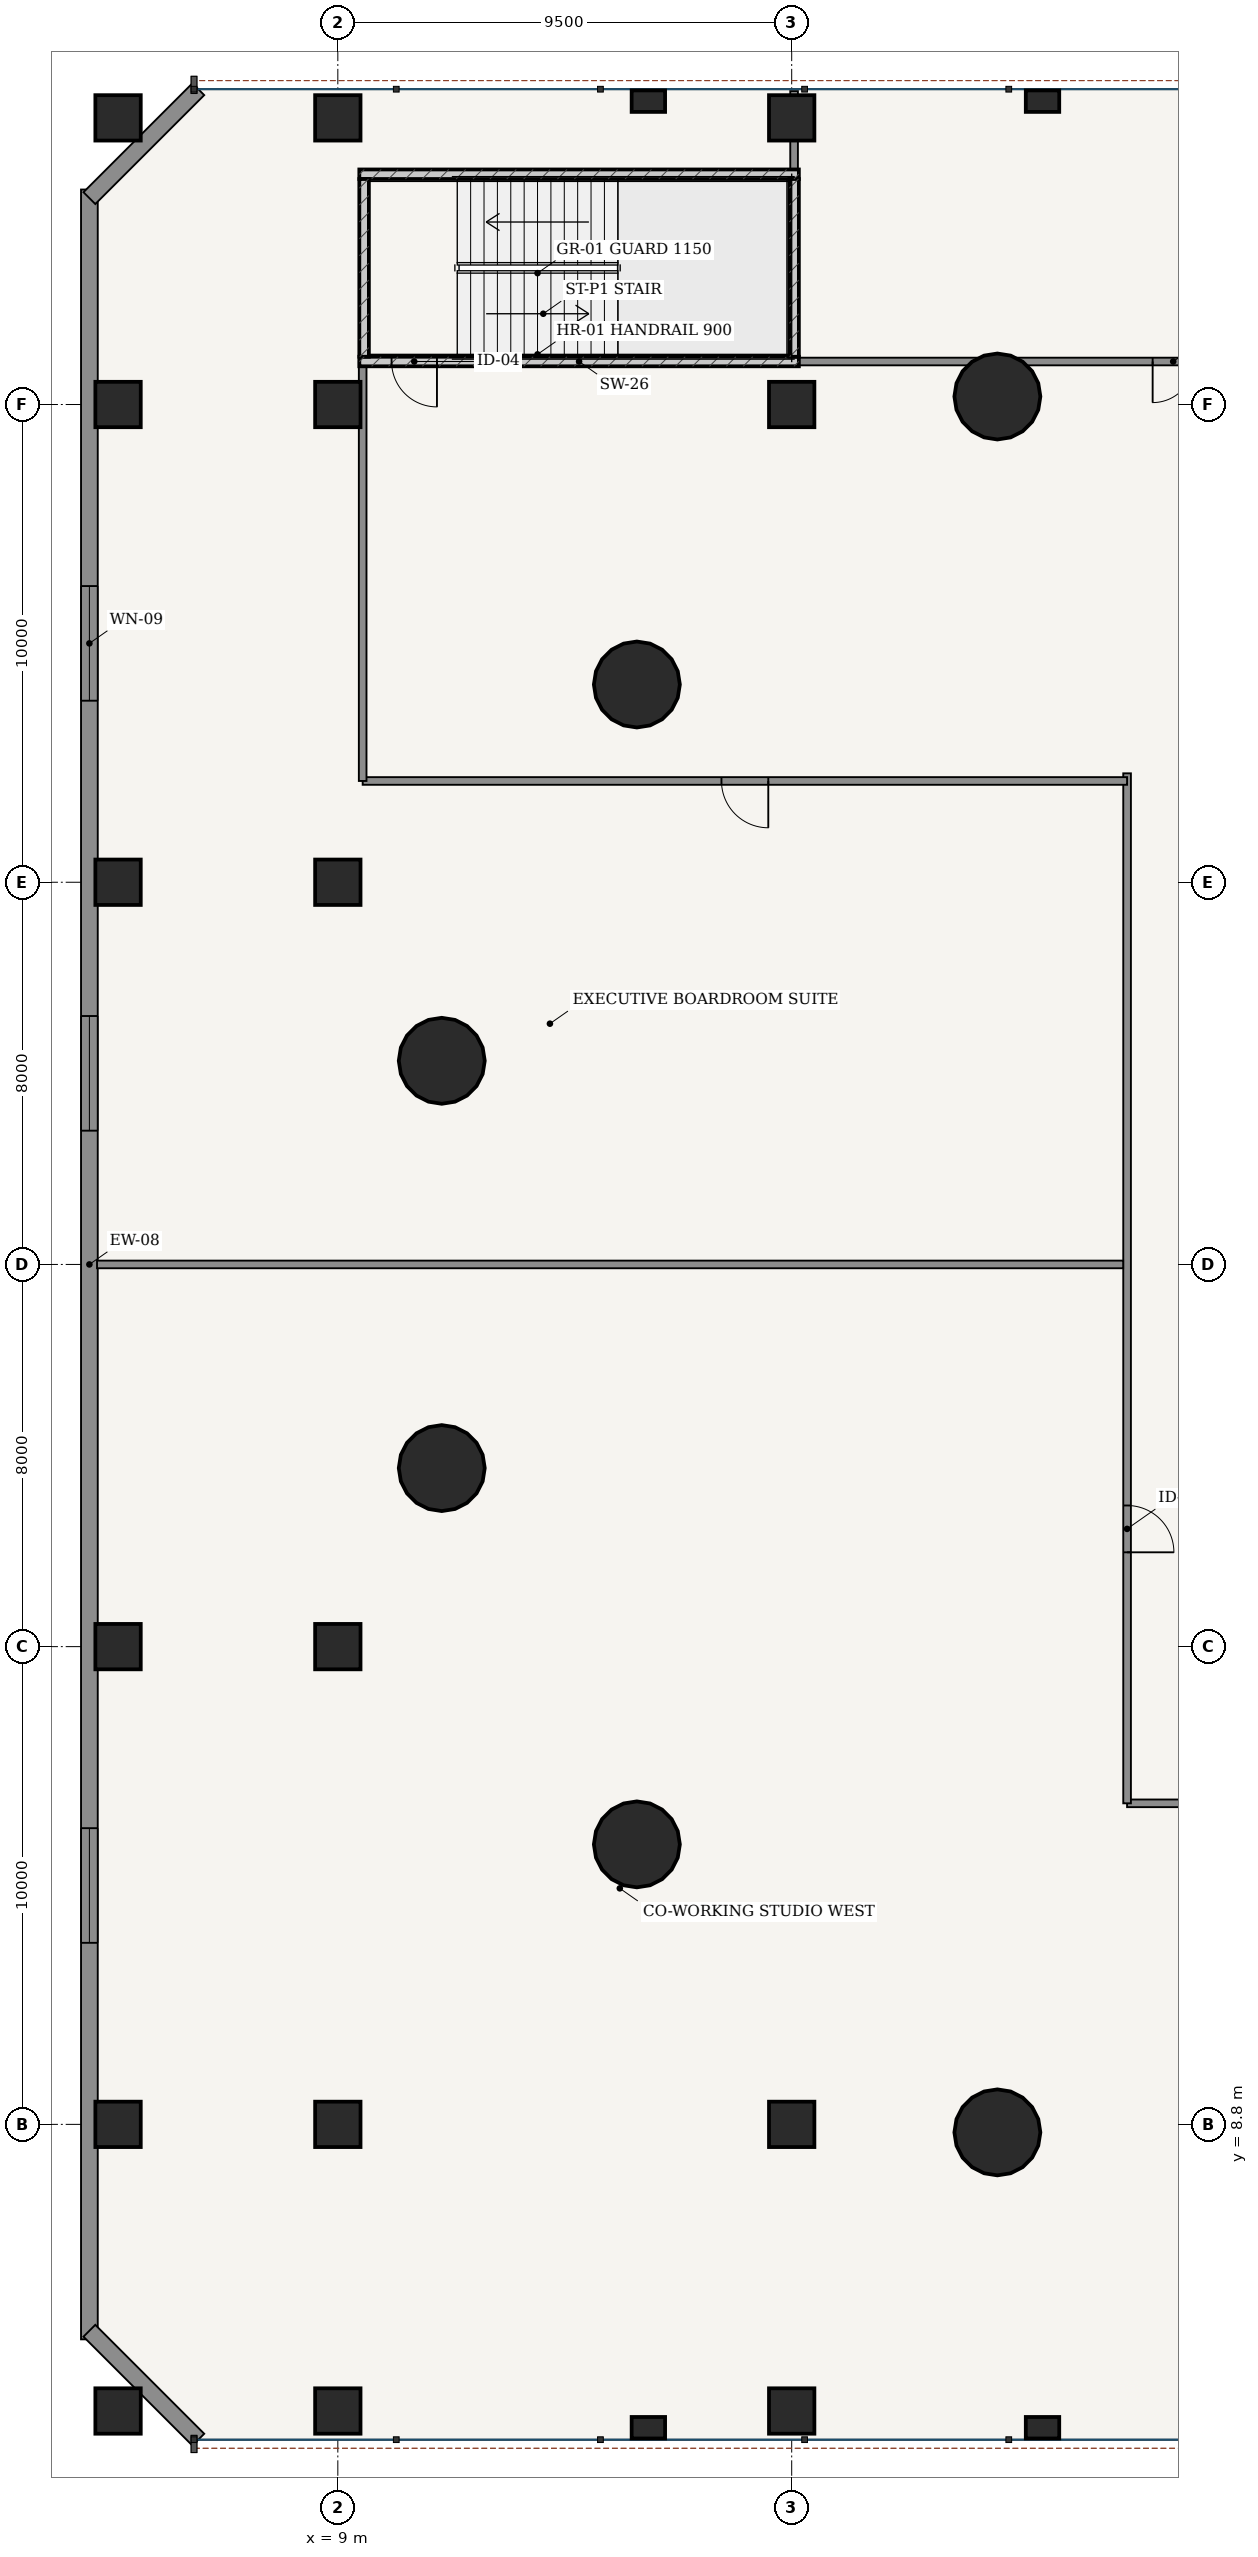
"""IFC4 building model, lengths in metres.
Left out: names, types, materials, properties, quantities, classifications, styles, units other than length and angle.
Written with IfcOpenShell. Run it as: python <this file> out.ifc"""

import sys

from ifc_helpers import new_model, si_unit, direction, frame, frame_2d, origin, origin_2d, place, context, subcontext, project, spatial, rectangle, hollow_circle, extrude, source, transform, mapped, element, fill, save


model = new_model("IFC4")
c1 = context("Model", 3, precision=1e-05, world=origin(), true_north=direction((-0.2419218956, 0.970295726276)))
c2 = subcontext(c1, "Body", "Model", "MODEL_VIEW")
j1 = project(units=[si_unit("LENGTHUNIT", "METRE"), si_unit("PLANEANGLEUNIT", "RADIAN")], contexts=[c1])
p1 = place(None, origin())
s1 = spatial("IfcSite", under=j1, at=p1, CompositionType="ELEMENT")
p2 = place(p1, origin())
s2 = spatial("IfcBuilding", under=s1, at=p2, CompositionType="ELEMENT")
p3 = place(p2, frame((0.0, 0.0, 9.9)))
s3 = spatial("IfcBuildingStorey", under=s2, at=p3, CompositionType="ELEMENT", Elevation=9.9)
p4 = place(p3, frame((9.45, 45.7, 0.0), z_axis=(0.0, 0.0, 1.0), x_axis=(1.0, 0.0, 0.0)))
e1 = element("IfcWall", 1, at=p4, inside=s3, PredefinedType="SOLIDWALL", context=c2, shape_type="SweptSolid", body=[
    extrude(rectangle(XDim=9.2, YDim=0.2, at=frame_2d((4.6, 0.0))), origin(), (0.0, 0.0, 1.0), 4.2),
])
p5 = place(p4, frame((0.675, 0.0, 0.0)))
e2 = element("IfcOpeningElement", 2, at=p5, cuts=e1, PredefinedType="OPENING", context=c2, shape_type="SweptSolid", body=[
    extrude(rectangle(XDim=0.95, YDim=2.15, at=frame_2d((0.475, 1.075))), frame((0.0, 0.11, 0.0), z_axis=(0.0, -1.0, 0.0), x_axis=(1.0, 0.0, 0.0)), (0.0, 0.0, 1.0), 0.22),
])
p6 = place(p3, frame((9.45, 49.62, 0.0), z_axis=(0.0, 0.0, 1.0), x_axis=(1.0, 0.0, 0.0)))
e3 = element("IfcWall", 3, at=p6, inside=s3, PredefinedType="SOLIDWALL", context=c2, shape_type="SweptSolid", body=[
    extrude(rectangle(XDim=9.2, YDim=0.2, at=frame_2d((4.6, 0.0))), origin(), (0.0, 0.0, 1.0), 4.2),
])
for number, where, z_axis, x_axis in (
    (4, (9.55, 45.8, 0.0), (0.0, 0.0, 1.0), (0.0, 1.0, 0.0)),
    (5, (18.55, 45.8, 0.0), (0.0, 0.0, 1.0), (0.0, 1.0, 0.0)),
):
    element("IfcWall", number, at=place(p3, frame(where, z_axis=z_axis, x_axis=x_axis)), inside=s3, PredefinedType="SOLIDWALL", context=c2, shape_type="SweptSolid", body=[
        extrude(rectangle(XDim=3.72, YDim=0.2, at=frame_2d((1.86, 0.0))), origin(), (0.0, 0.0, 1.0), 4.2),
    ])
for number, where, z_axis, x_axis in (
    (6, (22.805, 44.968, 0.0), (0.0, 0.0, 1.0), (1.0, 0.0, 0.0)),
    (7, (15.259, 38.939, 0.0), (0.0, 0.0, 1.0), (1.0, 0.0, 0.0)),
    (8, (11.176, 31.063, 0.0), (0.0, 0.0, 1.0), (1.0, 0.0, 0.0)),
    (9, (11.176, 22.537, 0.0), (0.0, 0.0, 1.0), (1.0, 0.0, 0.0)),
    (10, (15.259, 14.661, 0.0), (0.0, 0.0, 1.0), (1.0, 0.0, 0.0)),
    (11, (22.805, 8.632, 0.0), (0.0, 0.0, 1.0), (1.0, 0.0, 0.0)),
):
    element("IfcColumn", number, at=place(p3, frame(where, z_axis=z_axis, x_axis=x_axis)), inside=s3, PredefinedType="COLUMN", context=c2, shape_type="SweptSolid", body=[
        extrude(hollow_circle(Radius=0.9, WallThickness=0.055, at=origin_2d()), origin(), (0.0, 0.0, 1.0), 4.5),
    ])
for number, where, z_axis, x_axis in (
    (12, (4.4, 2.8, 0.0), (0.0, 0.0, 1.0), (1.0, 0.0, 0.0)),
    (13, (4.4, 8.8, 0.0), (0.0, 0.0, 1.0), (1.0, 0.0, 0.0)),
    (14, (4.4, 18.8, 0.0), (0.0, 0.0, 1.0), (1.0, 0.0, 0.0)),
    (15, (4.4, 34.8, 0.0), (0.0, 0.0, 1.0), (1.0, 0.0, 0.0)),
    (16, (4.4, 44.8, 0.0), (0.0, 0.0, 1.0), (1.0, 0.0, 0.0)),
    (17, (4.4, 50.8, 0.0), (0.0, 0.0, 1.0), (1.0, 0.0, 0.0)),
    (18, (9.0, 2.8, 0.0), (0.0, 0.0, 1.0), (1.0, 0.0, 0.0)),
    (19, (9.0, 8.8, 0.0), (0.0, 0.0, 1.0), (1.0, 0.0, 0.0)),
    (20, (9.0, 18.8, 0.0), (0.0, 0.0, 1.0), (1.0, 0.0, 0.0)),
    (21, (9.0, 34.8, 0.0), (0.0, 0.0, 1.0), (1.0, 0.0, 0.0)),
    (22, (9.0, 44.8, 0.0), (0.0, 0.0, 1.0), (1.0, 0.0, 0.0)),
    (23, (9.0, 50.8, 0.0), (0.0, 0.0, 1.0), (1.0, 0.0, 0.0)),
    (24, (18.5, 2.8, 0.0), (0.0, 0.0, 1.0), (1.0, 0.0, 0.0)),
    (25, (18.5, 8.8, 0.0), (0.0, 0.0, 1.0), (1.0, 0.0, 0.0)),
    (26, (18.5, 44.8, 0.0), (0.0, 0.0, 1.0), (1.0, 0.0, 0.0)),
    (27, (18.5, 50.8, 0.0), (0.0, 0.0, 1.0), (1.0, 0.0, 0.0)),
):
    element("IfcColumn", number, at=place(p3, frame(where, z_axis=z_axis, x_axis=x_axis)), inside=s3, PredefinedType="COLUMN", context=c2, shape_type="SweptSolid", body=[
        extrude(rectangle(XDim=0.95, YDim=0.95, at=origin_2d()), origin(), (0.0, 0.0, 1.0), 4.5),
    ])
for number, where, z_axis, x_axis in (
    (28, (15.5, 2.45, 0.0), (0.0, 0.0, 1.0), (1.0, 0.0, 0.0)),
    (29, (15.5, 51.15, 0.0), (0.0, 0.0, 1.0), (1.0, 0.0, 0.0)),
    (30, (23.75, 2.45, 0.0), (0.0, 0.0, 1.0), (1.0, 0.0, 0.0)),
    (31, (23.75, 51.15, 0.0), (0.0, 0.0, 1.0), (1.0, 0.0, 0.0)),
):
    element("IfcColumn", number, at=place(p3, frame(where, z_axis=z_axis, x_axis=x_axis)), inside=s3, PredefinedType="PILASTER", context=c2, shape_type="SweptSolid", body=[
        extrude(rectangle(XDim=0.7, YDim=0.45, at=origin_2d()), origin(), (0.0, 0.0, 1.0), 4.5),
    ])
p7 = place(p3, frame((3.8, 49.3, 0.0), z_axis=(0.0, 0.0, 1.0), x_axis=(0.0, -1.0, 0.0)))
e32 = element("IfcWall", 32, at=p7, inside=s3, PredefinedType="SOLIDWALL", context=c2, shape_type="SweptSolid", body=[
    extrude(rectangle(XDim=45.0, YDim=0.35, at=frame_2d((22.5, 0.0))), origin(), (0.0, 0.0, 1.0), 4.2),
])
p8 = place(p7, frame((8.3, 0.0, 0.85)))
e33 = element("IfcOpeningElement", 33, at=p8, cuts=e32, PredefinedType="OPENING", context=c2, shape_type="SweptSolid", body=[
    extrude(rectangle(XDim=2.4, YDim=2.2, at=frame_2d((1.2, 1.1))), frame((0.0, 0.185, 0.0), z_axis=(0.0, -1.0, 0.0), x_axis=(1.0, 0.0, 0.0)), (0.0, 0.0, 1.0), 0.37),
])
p9 = place(p7, frame((17.3, 0.0, 0.85)))
e34 = element("IfcOpeningElement", 34, at=p9, cuts=e32, PredefinedType="OPENING", context=c2, shape_type="SweptSolid", body=[
    extrude(rectangle(XDim=2.4, YDim=2.2, at=frame_2d((1.2, 1.1))), frame((0.0, 0.185, 0.0), z_axis=(0.0, -1.0, 0.0), x_axis=(1.0, 0.0, 0.0)), (0.0, 0.0, 1.0), 0.37),
])
p10 = place(p7, frame((34.3, 0.0, 0.85)))
e35 = element("IfcOpeningElement", 35, at=p10, cuts=e32, PredefinedType="OPENING", context=c2, shape_type="SweptSolid", body=[
    extrude(rectangle(XDim=2.4, YDim=2.2, at=frame_2d((1.2, 1.1))), frame((0.0, 0.185, 0.0), z_axis=(0.0, -1.0, 0.0), x_axis=(1.0, 0.0, 0.0)), (0.0, 0.0, 1.0), 0.37),
])
for number, where, z_axis, x_axis in (
    (36, (3.8, 4.48, 0.0), (0.0, 0.0, 1.0), (0.707, -0.707, 0.0)),
    (37, (6.08, 51.4, 0.0), (0.0, 0.0, 1.0), (-0.707, -0.707, 0.0)),
):
    element("IfcWall", number, at=place(p3, frame(where, z_axis=z_axis, x_axis=x_axis)), inside=s3, PredefinedType="SOLIDWALL", context=c2, shape_type="SweptSolid", body=[
        extrude(rectangle(XDim=3.224, YDim=0.35, at=frame_2d((1.612, 0.0))), origin(), (0.0, 0.0, 1.0), 3.235),
    ])
p11 = place(p3, frame((25.52, 15.52, 0.0), z_axis=(0.0, 0.0, 1.0), x_axis=(1.0, 0.0, 0.0)))
e38 = element("IfcWall", 38, at=p11, inside=s3, PredefinedType="PARTITIONING", context=c2, shape_type="SweptSolid", body=[
    extrude(rectangle(XDim=24.96, YDim=0.16, at=frame_2d((12.48, 0.0))), origin(), (0.0, 0.0, 1.0), 3.55),
])
p12 = place(p11, frame((5.854, 0.0, 0.0)))
e39 = element("IfcOpeningElement", 39, at=p12, cuts=e38, PredefinedType="OPENING", context=c2, shape_type="SweptSolid", body=[
    extrude(rectangle(XDim=0.98, YDim=2.2, at=frame_2d((0.49, 1.1))), frame((0.0, 0.09, 0.0), z_axis=(0.0, -1.0, 0.0), x_axis=(1.0, 0.0, 0.0)), (0.0, 0.0, 1.0), 0.18),
])
p13 = place(p11, frame((18.125, 0.0, 0.0)))
e40 = element("IfcOpeningElement", 40, at=p13, cuts=e38, PredefinedType="OPENING", context=c2, shape_type="SweptSolid", body=[
    extrude(rectangle(XDim=0.98, YDim=2.2, at=frame_2d((0.49, 1.1))), frame((0.0, 0.09, 0.0), z_axis=(0.0, -1.0, 0.0), x_axis=(1.0, 0.0, 0.0)), (0.0, 0.0, 1.0), 0.18),
])
p14 = place(p3, frame((25.52, 15.52, 0.0), z_axis=(0.0, 0.0, 1.0), x_axis=(0.0, 1.0, 0.0)))
e41 = element("IfcWall", 41, at=p14, inside=s3, PredefinedType="PARTITIONING", context=c2, shape_type="SweptSolid", body=[
    extrude(rectangle(XDim=21.56, YDim=0.16, at=frame_2d((10.78, 0.0))), origin(), (0.0, 0.0, 1.0), 3.55),
])
p15 = place(p14, frame((5.254, 0.0, 0.0)))
e42 = element("IfcOpeningElement", 42, at=p15, cuts=e41, PredefinedType="OPENING", context=c2, shape_type="SweptSolid", body=[
    extrude(rectangle(XDim=0.98, YDim=2.2, at=frame_2d((0.49, 1.1))), frame((0.0, 0.09, 0.0), z_axis=(0.0, -1.0, 0.0), x_axis=(1.0, 0.0, 0.0)), (0.0, 0.0, 1.0), 0.18),
])
p16 = place(p3, frame((9.52, 36.92, 0.0), z_axis=(0.0, 0.0, 1.0), x_axis=(1.0, 0.0, 0.0)))
e43 = element("IfcWall", 43, at=p16, inside=s3, PredefinedType="PARTITIONING", context=c2, shape_type="SweptSolid", body=[
    extrude(rectangle(XDim=16.0, YDim=0.16, at=frame_2d((8.0, 0.0))), origin(), (0.0, 0.0, 1.0), 3.55),
])
p17 = place(p16, frame((7.51, 0.0, 0.0)))
e44 = element("IfcOpeningElement", 44, at=p17, cuts=e43, PredefinedType="OPENING", context=c2, shape_type="SweptSolid", body=[
    extrude(rectangle(XDim=0.98, YDim=2.2, at=frame_2d((0.49, 1.1))), frame((0.0, 0.09, 0.0), z_axis=(0.0, -1.0, 0.0), x_axis=(1.0, 0.0, 0.0)), (0.0, 0.0, 1.0), 0.18),
])
p18 = place(p3, frame((9.52, 36.92, 0.0), z_axis=(0.0, 0.0, 1.0), x_axis=(0.0, 1.0, 0.0)))
e45 = element("IfcWall", 45, at=p18, inside=s3, PredefinedType="PARTITIONING", context=c2, shape_type="SweptSolid", body=[
    extrude(rectangle(XDim=8.78, YDim=0.16, at=frame_2d((4.39, 0.0))), origin(), (0.0, 0.0, 1.0), 3.569),
])
p19 = place(p3, frame((18.55, 45.7, 0.0), z_axis=(0.0, 0.0, 1.0), x_axis=(1.0, 0.0, 0.0)))
e46 = element("IfcWall", 46, at=p19, inside=s3, PredefinedType="PARTITIONING", context=c2, shape_type="SweptSolid", body=[
    extrude(rectangle(XDim=38.9, YDim=0.16, at=frame_2d((19.45, 0.0))), origin(), (0.0, 0.0, 1.0), 3.55),
])
p20 = place(p19, frame((7.505, 0.0, 0.0)))
e47 = element("IfcOpeningElement", 47, at=p20, cuts=e46, PredefinedType="OPENING", context=c2, shape_type="SweptSolid", body=[
    extrude(rectangle(XDim=0.86, YDim=2.1, at=frame_2d((0.43, 1.05))), frame((0.0, 0.09, 0.0), z_axis=(0.0, -1.0, 0.0), x_axis=(1.0, 0.0, 0.0)), (0.0, 0.0, 1.0), 0.18),
])
p21 = place(p19, frame((19.02, 0.0, 0.0)))
e48 = element("IfcOpeningElement", 48, at=p21, cuts=e46, PredefinedType="OPENING", context=c2, shape_type="SweptSolid", body=[
    extrude(rectangle(XDim=0.86, YDim=2.1, at=frame_2d((0.43, 1.05))), frame((0.0, 0.09, 0.0), z_axis=(0.0, -1.0, 0.0), x_axis=(1.0, 0.0, 0.0)), (0.0, 0.0, 1.0), 0.18),
])
p22 = place(p19, frame((30.475, 0.0, 0.0)))
e49 = element("IfcOpeningElement", 49, at=p22, cuts=e46, PredefinedType="OPENING", context=c2, shape_type="SweptSolid", body=[
    extrude(rectangle(XDim=0.98, YDim=2.2, at=frame_2d((0.49, 1.1))), frame((0.0, 0.09, 0.0), z_axis=(0.0, -1.0, 0.0), x_axis=(1.0, 0.0, 0.0)), (0.0, 0.0, 1.0), 0.18),
])
p23 = place(p3, frame((3.96, 26.8, 0.0), z_axis=(0.0, 0.0, 1.0), x_axis=(1.0, 0.0, 0.0)))
e50 = element("IfcWall", 50, at=p23, inside=s3, PredefinedType="PARTITIONING", context=c2, shape_type="SweptSolid", body=[
    extrude(rectangle(XDim=21.478, YDim=0.16, at=frame_2d((10.739, 0.0))), origin(), (0.0, 0.0, 1.0), 3.642),
])
p24 = place(p3, frame((18.55, 49.722, 0.0), z_axis=(0.0, 0.0, 1.0), x_axis=(0.0, 1.0, 0.0)))
e51 = element("IfcWall", 51, at=p24, inside=s3, PredefinedType="PARTITIONING", context=c2, shape_type="SweptSolid", body=[
    extrude(rectangle(XDim=1.638, YDim=0.16, at=frame_2d((0.819, 0.0))), origin(), (0.0, 0.0, 1.0), 3.235),
])
m1 = source(origin(), c2, "Body", "SweptSolid", [
    extrude(rectangle(XDim=2.4, YDim=2.2, at=frame_2d((1.2, 1.1))), frame((0.0, 0.03, 0.0), z_axis=(0.0, -1.0, 0.0), x_axis=(1.0, 0.0, 0.0)), (0.0, 0.0, 1.0), 0.06),
])
p25 = place(p8, origin())
e52 = element("IfcWindow", 52, at=p25, inside=s3, PartitioningType="SINGLE_PANEL", PredefinedType="WINDOW", context=c2, shape_type="MappedRepresentation", body=[
    mapped(m1, transform((0.0, 0.0, 0.0), scale=1.0)),
])
fill(e33, e52)
p26 = place(p9, origin())
e53 = element("IfcWindow", 53, at=p26, inside=s3, PartitioningType="SINGLE_PANEL", PredefinedType="WINDOW", context=c2, shape_type="MappedRepresentation", body=[
    mapped(m1, transform((0.0, 0.0, 0.0), scale=1.0)),
])
fill(e34, e53)
p27 = place(p10, origin())
e54 = element("IfcWindow", 54, at=p27, inside=s3, PartitioningType="SINGLE_PANEL", PredefinedType="WINDOW", context=c2, shape_type="MappedRepresentation", body=[
    mapped(m1, transform((0.0, 0.0, 0.0), scale=1.0)),
])
fill(e35, e54)
m2 = source(origin(), c2, "Body", "SweptSolid", [
    extrude(rectangle(XDim=0.95, YDim=2.15, at=frame_2d((0.475, 1.075))), frame((0.0, 0.025, 0.0), z_axis=(0.0, -1.0, 0.0), x_axis=(1.0, 0.0, 0.0)), (0.0, 0.0, 1.0), 0.05),
])
p28 = place(p5, frame((0.95, 0.0, 0.0), z_axis=(0.0, 0.0, 1.0), x_axis=(-1.0, 0.0, 0.0)))
e55 = element("IfcDoor", 55, at=p28, inside=s3, OperationType="SINGLE_SWING_LEFT", PredefinedType="DOOR", context=c2, shape_type="MappedRepresentation", body=[
    mapped(m2, transform((0.0, 0.0, 0.0), scale=1.0)),
])
fill(e2, e55)
m3 = source(origin(), c2, "Body", "SweptSolid", [
    extrude(rectangle(XDim=0.98, YDim=2.2, at=frame_2d((0.49, 1.1))), frame((0.0, 0.025, 0.0), z_axis=(0.0, -1.0, 0.0), x_axis=(1.0, 0.0, 0.0)), (0.0, 0.0, 1.0), 0.05),
])
p29 = place(p15, frame((0.98, 0.0, 0.0), z_axis=(0.0, 0.0, 1.0), x_axis=(-1.0, 0.0, 0.0)))
e56 = element("IfcDoor", 56, at=p29, inside=s3, OperationType="SINGLE_SWING_RIGHT", PredefinedType="DOOR", context=c2, shape_type="MappedRepresentation", body=[
    mapped(m3, transform((0.0, 0.0, 0.0), scale=1.0)),
])
fill(e42, e56)
p30 = place(p17, frame((0.98, 0.0, 0.0), z_axis=(0.0, 0.0, 1.0), x_axis=(-1.0, 0.0, 0.0)))
e57 = element("IfcDoor", 57, at=p30, inside=s3, OperationType="SINGLE_SWING_LEFT", PredefinedType="DOOR", context=c2, shape_type="MappedRepresentation", body=[
    mapped(m3, transform((0.0, 0.0, 0.0), scale=1.0)),
])
fill(e44, e57)
m4 = source(origin(), c2, "Body", "SweptSolid", [
    extrude(rectangle(XDim=0.86, YDim=2.1, at=frame_2d((0.43, 1.05))), frame((0.0, 0.025, 0.0), z_axis=(0.0, -1.0, 0.0), x_axis=(1.0, 0.0, 0.0)), (0.0, 0.0, 1.0), 0.05),
])
p31 = place(p20, frame((0.86, 0.0, 0.0), z_axis=(0.0, 0.0, 1.0), x_axis=(-1.0, 0.0, 0.0)))
e58 = element("IfcDoor", 58, at=p31, inside=s3, OperationType="SINGLE_SWING_RIGHT", PredefinedType="DOOR", context=c2, shape_type="MappedRepresentation", body=[
    mapped(m4, transform((0.0, 0.0, 0.0), scale=1.0)),
])
fill(e47, e58)
save(model, sys.argv[1])
